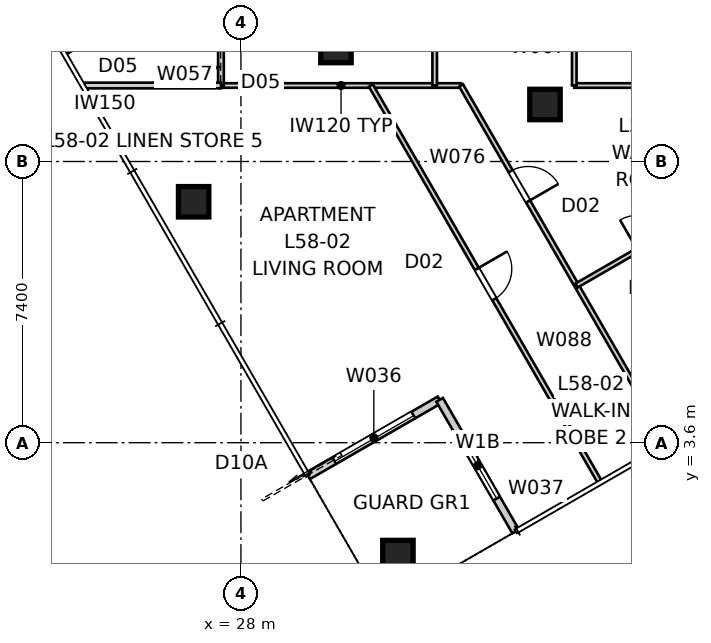
"""IFC4 building model, lengths in metres.
Left out: names, types, materials, properties, quantities, classifications, styles, units other than length and angle.
Written with IfcOpenShell. Run it as: python <this file> out.ifc"""

import sys

from ifc_helpers import new_model, si_unit, direction, frame, frame_2d, origin, origin_2d, place, context, subcontext, project, spatial, rectangle, extrude, element, fill, save


model = new_model("IFC4")
c1 = context("Model", 3, precision=1e-05, world=origin(), true_north=direction((0.0, 1.0)))
c2 = subcontext(c1, "Body", "Model", "MODEL_VIEW")
j1 = project(units=[si_unit("LENGTHUNIT", "METRE"), si_unit("PLANEANGLEUNIT", "RADIAN")], contexts=[c1])
p1 = place(None, origin())
s1 = spatial("IfcSite", under=j1, at=p1, CompositionType="ELEMENT")
p2 = place(p1, origin())
s2 = spatial("IfcBuilding", under=s1, at=p2, CompositionType="ELEMENT")
p3 = place(p2, frame((0.0, 0.0, 211.6)))
s3 = spatial("IfcBuildingStorey", under=s2, at=p3, CompositionType="ELEMENT", Elevation=211.6)
for number, where, z_axis, x_axis in (
    (1, (32.13, 0.63, 0.0), (0.0, 0.0, 1.0), (1.0, 0.0, 0.0)),
    (2, (26.755, 9.94, 0.0), (0.0, 0.0, 1.0), (1.0, 0.0, 0.0)),
    (3, (30.5, 14.0, 0.0), (0.0, 0.0, 1.0), (1.0, 0.0, 0.0)),
    (4, (36.0, 12.5, 0.0), (0.0, 0.0, 1.0), (1.0, 0.0, 0.0)),
):
    element("IfcColumn", number, at=place(p3, frame(where, z_axis=z_axis, x_axis=x_axis)), inside=s3, PredefinedType="COLUMN", context=c2, shape_type="SweptSolid", body=[
        extrude(rectangle(XDim=0.8, YDim=0.8, at=origin_2d()), origin(), (0.0, 0.0, 1.0), 3.4),
    ])
p4 = place(p3, frame((29.764, 2.729, 0.0), z_axis=(0.0, 0.0, 1.0), x_axis=(0.866026010844, 0.49999894854, 0.0)))
e5 = element("IfcWall", 5, at=p4, inside=s3, PredefinedType="SOLIDWALL", context=c2, shape_type="SweptSolid", body=[
    extrude(rectangle(XDim=4.0, YDim=0.2, at=frame_2d((2.0, 0.0))), origin(), (0.0, 0.0, 1.0), 3.25),
])
p5 = place(p4, frame((0.8, 0.0, 0.0)))
e6 = element("IfcOpeningElement", 6, at=p5, cuts=e5, PredefinedType="OPENING", context=c2, shape_type="SweptSolid", body=[
    extrude(rectangle(XDim=2.4, YDim=2.1, at=frame_2d((1.2, 1.05))), frame((0.0, 0.11, 0.0), z_axis=(0.0, -1.0, 0.0), x_axis=(1.0, 0.0, 0.0)), (0.0, 0.0, 1.0), 0.22),
])
p6 = place(p3, frame((33.229, 4.729, 0.0), z_axis=(0.0, 0.0, 1.0), x_axis=(0.49999894854, -0.866026010844, 0.0)))
e7 = element("IfcWall", 7, at=p6, inside=s3, PredefinedType="SOLIDWALL", context=c2, shape_type="SweptSolid", body=[
    extrude(rectangle(XDim=4.0, YDim=0.2, at=frame_2d((2.0, 0.0))), origin(), (0.0, 0.0, 1.0), 3.25),
])
p7 = place(p6, frame((1.0, 0.0, 0.45)))
e8 = element("IfcOpeningElement", 8, at=p7, cuts=e7, PredefinedType="OPENING", context=c2, shape_type="SweptSolid", body=[
    extrude(rectangle(XDim=2.0, YDim=1.8, at=frame_2d((1.0, 0.9))), frame((0.0, 0.11, 0.0), z_axis=(0.0, -1.0, 0.0), x_axis=(1.0, 0.0, 0.0)), (0.0, 0.0, 1.0), 0.22),
])
p8 = place(p3, frame((33.793, 13.0, 0.0), z_axis=(0.0, 0.0, 1.0), x_axis=(-1.0, 0.0, 0.0)))
e9 = element("IfcWall", 9, at=p8, inside=s3, PredefinedType="PARTITIONING", context=c2, shape_type="SweptSolid", body=[
    extrude(rectangle(XDim=6.32, YDim=0.12, at=frame_2d((3.16, 0.0))), origin(), (0.0, 0.0, 1.0), 3.25),
])
p9 = place(p3, frame((33.098, 17.9, 0.0), z_axis=(0.0, 0.0, 1.0), x_axis=(0.0, -1.0, 0.0)))
e10 = element("IfcWall", 10, at=p9, inside=s3, PredefinedType="PARTITIONING", context=c2, shape_type="SweptSolid", body=[
    extrude(rectangle(XDim=4.9, YDim=0.12, at=frame_2d((2.45, 0.0))), origin(), (0.0, 0.0, 1.0), 3.25),
])
p10 = place(p9, frame((3.018, 0.0, 0.0)))
e11 = element("IfcOpeningElement", 11, at=p10, cuts=e10, PredefinedType="OPENING", context=c2, shape_type="SweptSolid", body=[
    extrude(rectangle(XDim=0.96, YDim=2.1, at=frame_2d((0.48, 1.05))), frame((0.0, 0.07, 0.0), z_axis=(0.0, -1.0, 0.0), x_axis=(1.0, 0.0, 0.0)), (0.0, 0.0, 1.0), 0.14),
])
p11 = place(p9, frame((0.588, 0.0, 0.0)))
e12 = element("IfcOpeningElement", 12, at=p11, cuts=e10, PredefinedType="OPENING", context=c2, shape_type="SweptSolid", body=[
    extrude(rectangle(XDim=0.92, YDim=2.34, at=frame_2d((0.46, 1.17))), frame((0.0, 0.07, 0.0), z_axis=(0.0, -1.0, 0.0), x_axis=(1.0, 0.0, 0.0)), (0.0, 0.0, 1.0), 0.14),
])
p12 = place(p3, frame((27.473, 13.0, 0.0), z_axis=(0.0, 0.0, 1.0), x_axis=(0.0, 1.0, 0.0)))
e13 = element("IfcWall", 13, at=p12, inside=s3, PredefinedType="SOLIDWALL", context=c2, shape_type="SweptSolid", body=[
    extrude(rectangle(XDim=3.314, YDim=0.15, at=frame_2d((1.657, 0.0))), origin(), (0.0, 0.0, 1.0), 3.25),
])
p13 = place(p12, frame((0.922, 0.0, 0.0)))
e14 = element("IfcOpeningElement", 14, at=p13, cuts=e13, PredefinedType="OPENING", context=c2, shape_type="SweptSolid", body=[
    extrude(rectangle(XDim=0.96, YDim=2.1, at=frame_2d((0.48, 1.05))), frame((0.0, 0.085, 0.0), z_axis=(0.0, -1.0, 0.0), x_axis=(1.0, 0.0, 0.0)), (0.0, 0.0, 1.0), 0.17),
])
p14 = place(p3, frame((27.473, 16.256, 0.0), z_axis=(0.0, 0.0, 1.0), x_axis=(-0.866047486323, -0.49996174997, 0.0)))
e15 = element("IfcWall", 15, at=p14, inside=s3, PredefinedType="SOLIDWALL", context=c2, shape_type="SweptSolid", body=[
    extrude(rectangle(XDim=4.74, YDim=0.15, at=frame_2d((2.37, 0.0))), origin(), (0.0, 0.0, 1.0), 3.25),
])
p15 = place(p14, frame((1.91, 0.0, 0.0)))
e16 = element("IfcOpeningElement", 16, at=p15, cuts=e15, PredefinedType="OPENING", context=c2, shape_type="SweptSolid", body=[
    extrude(rectangle(XDim=0.96, YDim=2.1, at=frame_2d((0.48, 1.05))), frame((0.0, 0.085, 0.0), z_axis=(0.0, -1.0, 0.0), x_axis=(1.0, 0.0, 0.0)), (0.0, 0.0, 1.0), 0.17),
])
p16 = place(p3, frame((39.192, 13.0, 0.0), z_axis=(0.0, 0.0, 1.0), x_axis=(-1.0, 0.0, 0.0)))
e17 = element("IfcWall", 17, at=p16, inside=s3, PredefinedType="PARTITIONING", context=c2, shape_type="SweptSolid", body=[
    extrude(rectangle(XDim=2.421, YDim=0.12, at=frame_2d((1.21, 0.0))), origin(), (0.0, 0.0, 1.0), 3.25),
])
p17 = place(p3, frame((36.771, 13.0, 0.0), z_axis=(0.0, 0.0, 1.0), x_axis=(0.0, 1.0, 0.0)))
e18 = element("IfcWall", 18, at=p17, inside=s3, PredefinedType="PARTITIONING", context=c2, shape_type="SweptSolid", body=[
    extrude(rectangle(XDim=4.9, YDim=0.12, at=frame_2d((2.45, 0.0))), origin(), (0.0, 0.0, 1.0), 3.25),
])
p18 = place(p17, frame((1.97, 0.0, 0.0)))
e19 = element("IfcOpeningElement", 19, at=p18, cuts=e18, PredefinedType="OPENING", context=c2, shape_type="SweptSolid", body=[
    extrude(rectangle(XDim=0.96, YDim=2.1, at=frame_2d((0.48, 1.05))), frame((0.0, 0.07, 0.0), z_axis=(0.0, -1.0, 0.0), x_axis=(1.0, 0.0, 0.0)), (0.0, 0.0, 1.0), 0.14),
])
p19 = place(p3, frame((31.419, 13.0, 0.0), z_axis=(0.0, 0.0, 1.0), x_axis=(0.499996550604, -0.866027395285, 0.0)))
e20 = element("IfcWall", 20, at=p19, inside=s3, PredefinedType="PARTITIONING", context=c2, shape_type="SweptSolid", body=[
    extrude(rectangle(XDim=12.028, YDim=0.12, at=frame_2d((6.014, 0.0))), origin(), (0.0, 0.0, 1.0), 3.25),
])
p20 = place(p19, frame((5.574, 0.0, 0.0)))
e21 = element("IfcOpeningElement", 21, at=p20, cuts=e20, PredefinedType="OPENING", context=c2, shape_type="SweptSolid", body=[
    extrude(rectangle(XDim=0.92, YDim=2.34, at=frame_2d((0.46, 1.17))), frame((0.0, 0.07, 0.0), z_axis=(0.0, -1.0, 0.0), x_axis=(1.0, 0.0, 0.0)), (0.0, 0.0, 1.0), 0.14),
])
p21 = place(p3, frame((23.88, 13.0, 0.0), z_axis=(0.0, 0.0, 1.0), x_axis=(1.0, 0.0, 0.0)))
e22 = element("IfcWall", 22, at=p21, inside=s3, PredefinedType="SOLIDWALL", context=c2, shape_type="SweptSolid", body=[
    extrude(rectangle(XDim=3.593, YDim=0.15, at=frame_2d((1.796, 0.0))), origin(), (0.0, 0.0, 1.0), 3.25),
])
p22 = place(p3, frame((33.793, 13.0, 0.0), z_axis=(0.0, 0.0, 1.0), x_axis=(0.499999922276, -0.866025448659, 0.0)))
e23 = element("IfcWall", 23, at=p22, inside=s3, PredefinedType="PARTITIONING", context=c2, shape_type="SweptSolid", body=[
    extrude(rectangle(XDim=10.841, YDim=0.12, at=frame_2d((5.42, 0.0))), origin(), (0.0, 0.0, 1.0), 3.25),
])
p23 = place(p22, frame((2.604, 0.0, 0.0)))
e24 = element("IfcOpeningElement", 24, at=p23, cuts=e23, PredefinedType="OPENING", context=c2, shape_type="SweptSolid", body=[
    extrude(rectangle(XDim=0.92, YDim=2.34, at=frame_2d((0.46, 1.17))), frame((0.0, 0.07, 0.0), z_axis=(0.0, -1.0, 0.0), x_axis=(1.0, 0.0, 0.0)), (0.0, 0.0, 1.0), 0.14),
])
p24 = place(p3, frame((36.832, 7.737, 0.0), z_axis=(0.0, 0.0, 1.0), x_axis=(0.866014397438, 0.500019063067, 0.0)))
e25 = element("IfcWall", 25, at=p24, inside=s3, PredefinedType="PARTITIONING", context=c2, shape_type="SweptSolid", body=[
    extrude(rectangle(XDim=5.035, YDim=0.12, at=frame_2d((2.518, 0.0))), origin(), (0.0, 0.0, 1.0), 3.25),
])
p25 = place(p24, frame((1.853, 0.0, 0.0)))
e26 = element("IfcOpeningElement", 26, at=p25, cuts=e25, PredefinedType="OPENING", context=c2, shape_type="SweptSolid", body=[
    extrude(rectangle(XDim=0.92, YDim=2.34, at=frame_2d((0.46, 1.17))), frame((0.0, 0.07, 0.0), z_axis=(0.0, -1.0, 0.0), x_axis=(1.0, 0.0, 0.0)), (0.0, 0.0, 1.0), 0.14),
])
p26 = place(p5, origin())
e27 = element("IfcDoor", 27, at=p26, inside=s3, OperationType="SLIDING_TO_LEFT", PredefinedType="DOOR", context=c2, shape_type="SweptSolid", body=[
    extrude(rectangle(XDim=2.4, YDim=2.1, at=frame_2d((1.2, 1.05))), frame((0.0, 0.025, 0.0), z_axis=(0.0, -1.0, 0.0), x_axis=(1.0, 0.0, 0.0)), (0.0, 0.0, 1.0), 0.05),
])
fill(e6, e27)
p27 = place(p7, origin())
e28 = element("IfcWindow", 28, at=p27, inside=s3, PartitioningType="SINGLE_PANEL", PredefinedType="WINDOW", context=c2, shape_type="SweptSolid", body=[
    extrude(rectangle(XDim=2.0, YDim=1.8, at=frame_2d((1.0, 0.9))), frame((0.0, 0.03, 0.0), z_axis=(0.0, -1.0, 0.0), x_axis=(1.0, 0.0, 0.0)), (0.0, 0.0, 1.0), 0.06),
])
fill(e8, e28)
p28 = place(p23, origin())
e29 = element("IfcDoor", 29, at=p28, inside=s3, OperationType="SINGLE_SWING_RIGHT", PredefinedType="DOOR", context=c2, shape_type="SweptSolid", body=[
    extrude(rectangle(XDim=0.92, YDim=2.34, at=frame_2d((0.46, 1.17))), frame((0.0, 0.025, 0.0), z_axis=(0.0, -1.0, 0.0), x_axis=(1.0, 0.0, 0.0)), (0.0, 0.0, 1.0), 0.05),
])
fill(e24, e29)
p29 = place(p20, origin())
e30 = element("IfcDoor", 30, at=p29, inside=s3, OperationType="SINGLE_SWING_LEFT", PredefinedType="DOOR", context=c2, shape_type="SweptSolid", body=[
    extrude(rectangle(XDim=0.92, YDim=2.34, at=frame_2d((0.46, 1.17))), frame((0.0, 0.025, 0.0), z_axis=(0.0, -1.0, 0.0), x_axis=(1.0, 0.0, 0.0)), (0.0, 0.0, 1.0), 0.05),
])
fill(e21, e30)
save(model, sys.argv[1])
